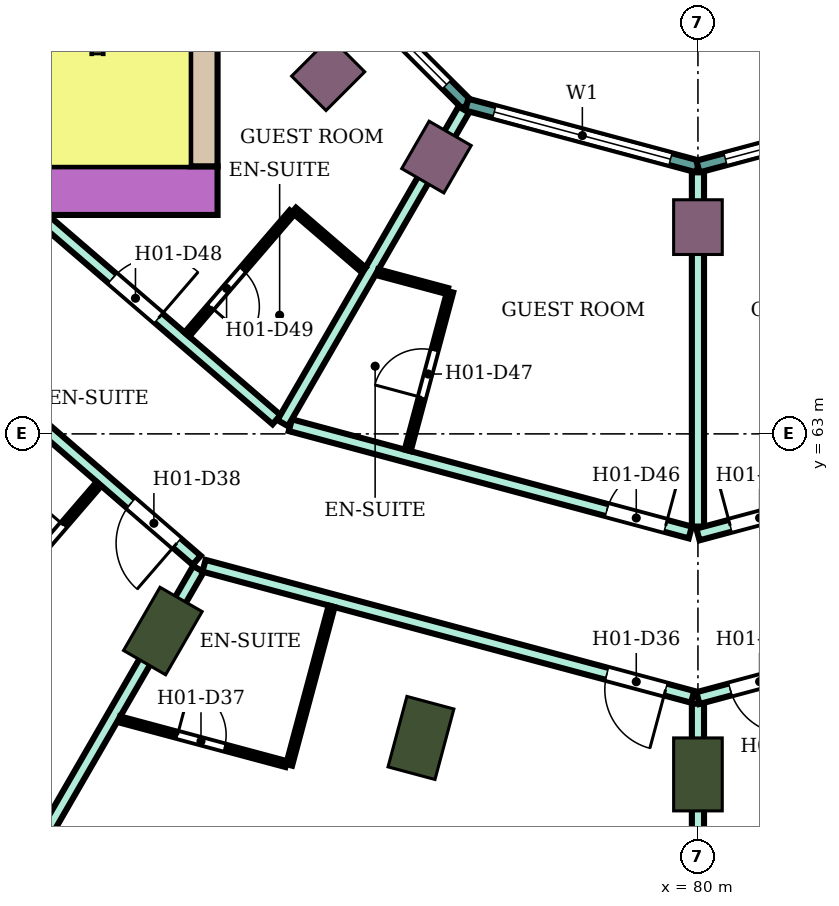
"""IFC4 building model, lengths in metres.
Left out: names, types, materials, properties, quantities, classifications, styles, units other than length and angle.
Written with IfcOpenShell. Run it as: python <this file> out.ifc"""

import sys

from ifc_helpers import new_model, si_unit, direction, frame, frame_2d, origin, origin_2d, place, context, subcontext, project, spatial, rectangle, extrude, element, fill, save


model = new_model("IFC4")
c1 = context("Model", 3, precision=1e-05, world=origin(), true_north=direction((0.0, 1.0)))
c2 = subcontext(c1, "Body", "Model", "MODEL_VIEW")
j1 = project(units=[si_unit("LENGTHUNIT", "METRE"), si_unit("PLANEANGLEUNIT", "RADIAN")], contexts=[c1])
p1 = place(None, origin())
s1 = spatial("IfcSite", under=j1, at=p1, CompositionType="ELEMENT")
p2 = place(p1, origin())
s2 = spatial("IfcBuilding", under=s1, at=p2, CompositionType="ELEMENT")
p3 = place(p2, frame((0.0, 0.0, 28.8)))
s3 = spatial("IfcBuildingStorey", under=s2, at=p3, CompositionType="ELEMENT", Elevation=28.8)
for number, where, z_axis, x_axis in (
    (1, (71.2, 59.758, 0.0), (0.0, 0.0, 1.0), (-0.5, -0.866, 0.0)),
    (2, (75.445, 58.0, 0.0), (0.0, 0.0, 1.0), (-0.259, -0.966, 0.0)),
    (3, (80.0, 57.4, 0.0), (0.0, 0.0, 1.0), (0.0, -1.0, 0.0)),
):
    element("IfcColumn", number, at=place(p3, frame(where, z_axis=z_axis, x_axis=x_axis)), inside=s3, PredefinedType="COLUMN", context=c2, shape_type="SweptSolid", body=[
        extrude(rectangle(XDim=1.2, YDim=0.8, at=origin_2d()), origin(), (0.0, 0.0, 1.0), 3.8),
    ])
for number, where, z_axis, x_axis in (
    (4, (73.919, 68.919, 0.0), (0.0, 0.0, 1.0), (-0.707, -0.707, 0.0)),
    (5, (75.7, 67.552, 0.0), (0.0, 0.0, 1.0), (-0.5, -0.866, 0.0)),
    (6, (80.0, 66.4, 0.0), (0.0, 0.0, 1.0), (0.0, -1.0, 0.0)),
):
    element("IfcColumn", number, at=place(p3, frame(where, z_axis=z_axis, x_axis=x_axis)), inside=s3, PredefinedType="COLUMN", context=c2, shape_type="SweptSolid", body=[
        extrude(rectangle(XDim=0.9, YDim=0.8, at=origin_2d()), origin(), (0.0, 0.0, 1.0), 3.8),
    ])
p4 = place(p3, frame((72.1, 67.0, 0.0), z_axis=(0.0, 0.0, 1.0), x_axis=(-1.0, 0.0, 0.0)))
e7 = element("IfcWall", 7, at=p4, inside=s3, PredefinedType="SHEAR", context=c2, shape_type="SweptSolid", body=[
    extrude(rectangle(XDim=14.7, YDim=0.8, at=frame_2d((7.35, 0.0))), origin(), (0.0, 0.0, 1.0), 3.48),
])
p5 = place(p4, frame((4.2, 0.0, 0.0)))
e8 = element("IfcOpeningElement", 8, at=p5, cuts=e7, PredefinedType="OPENING", context=c2, shape_type="SweptSolid", body=[
    extrude(rectangle(XDim=2.4, YDim=2.4, at=frame_2d((1.2, 1.2))), frame((0.0, 0.41, 0.0), z_axis=(0.0, -1.0, 0.0), x_axis=(1.0, 0.0, 0.0)), (0.0, 0.0, 1.0), 0.82),
])
p6 = place(p3, frame((71.875, 75.0, 0.0), z_axis=(0.0, 0.0, 1.0), x_axis=(0.0, -1.0, 0.0)))
e9 = element("IfcWall", 9, at=p6, inside=s3, PredefinedType="SHEAR", context=c2, shape_type="SweptSolid", body=[
    extrude(rectangle(XDim=7.6, YDim=0.45, at=frame_2d((3.8, 0.0))), origin(), (0.0, 0.0, 1.0), 3.48),
])
p7 = place(p3, frame((73.415, 71.198, 0.0), z_axis=(0.0, 0.0, 1.0), x_axis=(0.707106781187, -0.707106781187, 0.0)))
e10 = element("IfcWall", 10, at=p7, inside=s3, PredefinedType="NOTDEFINED", context=c2, shape_type="SweptSolid", body=[
    extrude(rectangle(XDim=3.936, YDim=0.2, at=frame_2d((1.968, 0.0))), origin(), (0.0, 0.0, 1.0), 3.8),
])
p8 = place(p7, frame((0.468, 0.0, 0.9)))
e11 = element("IfcOpeningElement", 11, at=p8, cuts=e10, PredefinedType="OPENING", context=c2, shape_type="SweptSolid", body=[
    extrude(rectangle(XDim=3.0, YDim=2.3, at=frame_2d((1.5, 1.15))), frame((0.0, 0.11, 0.0), z_axis=(0.0, -1.0, 0.0), x_axis=(1.0, 0.0, 0.0)), (0.0, 0.0, 1.0), 0.22),
])
p9 = place(p3, frame((76.198, 68.415, 0.0), z_axis=(0.0, 0.0, 1.0), x_axis=(0.965933654434, -0.258789828301, 0.0)))
e12 = element("IfcWall", 12, at=p9, inside=s3, PredefinedType="NOTDEFINED", context=c2, shape_type="SweptSolid", body=[
    extrude(rectangle(XDim=3.936, YDim=0.2, at=frame_2d((1.968, 0.0))), origin(), (0.0, 0.0, 1.0), 3.8),
])
p10 = place(p9, frame((0.468, 0.0, 0.9)))
e13 = element("IfcOpeningElement", 13, at=p10, cuts=e12, PredefinedType="OPENING", context=c2, shape_type="SweptSolid", body=[
    extrude(rectangle(XDim=3.0, YDim=2.3, at=frame_2d((1.5, 1.15))), frame((0.0, 0.11, 0.0), z_axis=(0.0, -1.0, 0.0), x_axis=(1.0, 0.0, 0.0)), (0.0, 0.0, 1.0), 0.22),
])
p11 = place(p3, frame((80.0, 67.396, 0.0), z_axis=(0.0, 0.0, 1.0), x_axis=(0.965933654434, 0.258789828301, 0.0)))
e14 = element("IfcWall", 14, at=p11, inside=s3, PredefinedType="NOTDEFINED", context=c2, shape_type="SweptSolid", body=[
    extrude(rectangle(XDim=3.936, YDim=0.2, at=frame_2d((1.968, 0.0))), origin(), (0.0, 0.0, 1.0), 3.8),
])
p12 = place(p11, frame((0.468, 0.0, 0.9)))
e15 = element("IfcOpeningElement", 15, at=p12, cuts=e14, PredefinedType="OPENING", context=c2, shape_type="SweptSolid", body=[
    extrude(rectangle(XDim=3.0, YDim=2.3, at=frame_2d((1.5, 1.15))), frame((0.0, 0.11, 0.0), z_axis=(0.0, -1.0, 0.0), x_axis=(1.0, 0.0, 0.0)), (0.0, 0.0, 1.0), 0.22),
])
p13 = place(p3, frame((67.078, 64.968, 0.0), z_axis=(0.0, 0.0, 1.0), x_axis=(0.756371089567, -0.654142778656, 0.0)))
e16 = element("IfcWall", 16, at=p13, inside=s3, PredefinedType="PARTITIONING", context=c2, shape_type="SweptSolid", body=[
    extrude(rectangle(XDim=6.185, YDim=0.2, at=frame_2d((3.093, 0.0))), origin(), (0.0, 0.0, 1.0), 3.35),
])
p14 = place(p13, frame((4.755, 0.0, 0.0)))
e17 = element("IfcOpeningElement", 17, at=p14, cuts=e16, PredefinedType="OPENING", context=c2, shape_type="SweptSolid", body=[
    extrude(rectangle(XDim=1.0, YDim=2.1, at=frame_2d((0.5, 1.05))), frame((0.0, 0.11, 0.0), z_axis=(0.0, -1.0, 0.0), x_axis=(1.0, 0.0, 0.0)), (0.0, 0.0, 1.0), 0.22),
])
p15 = place(p3, frame((67.096, 52.662, 0.0), z_axis=(0.0, 0.0, 1.0), x_axis=(0.500242450002, 0.865885379953, 0.0)))
e18 = element("IfcWall", 18, at=p15, inside=s3, PredefinedType="PARTITIONING", context=c2, shape_type="SweptSolid", body=[
    extrude(rectangle(XDim=9.374, YDim=0.2, at=frame_2d((4.687, 0.0))), origin(), (0.0, 0.0, 1.0), 3.35),
])
p16 = place(p3, frame((69.158, 66.6, 0.0), z_axis=(0.0, 0.0, 1.0), x_axis=(0.757976058094, -0.652282373943, 0.0)))
e19 = element("IfcWall", 19, at=p16, inside=s3, PredefinedType="PARTITIONING", context=c2, shape_type="SweptSolid", body=[
    extrude(rectangle(XDim=5.16, YDim=0.2, at=frame_2d((2.58, 0.0))), origin(), (0.0, 0.0, 1.0), 3.35),
])
p17 = place(p16, frame((1.6, 0.0, 0.0)))
e20 = element("IfcOpeningElement", 20, at=p17, cuts=e19, PredefinedType="OPENING", context=c2, shape_type="SweptSolid", body=[
    extrude(rectangle(XDim=1.0, YDim=2.1, at=frame_2d((0.5, 1.05))), frame((0.0, 0.11, 0.0), z_axis=(0.0, -1.0, 0.0), x_axis=(1.0, 0.0, 0.0)), (0.0, 0.0, 1.0), 0.22),
])
p18 = place(p3, frame((71.877, 60.831, 0.0), z_axis=(0.0, 0.0, 1.0), x_axis=(0.965852509869, -0.259092510851, 0.0)))
e21 = element("IfcWall", 21, at=p18, inside=s3, PredefinedType="PARTITIONING", context=c2, shape_type="SweptSolid", body=[
    extrude(rectangle(XDim=8.32, YDim=0.2, at=frame_2d((4.16, 0.0))), origin(), (0.0, 0.0, 1.0), 3.35),
])
p19 = place(p18, frame((6.86, 0.0, 0.0)))
e22 = element("IfcOpeningElement", 22, at=p19, cuts=e21, PredefinedType="OPENING", context=c2, shape_type="SweptSolid", body=[
    extrude(rectangle(XDim=1.0, YDim=2.1, at=frame_2d((0.5, 1.05))), frame((0.0, 0.11, 0.0), z_axis=(0.0, -1.0, 0.0), x_axis=(1.0, 0.0, 0.0)), (0.0, 0.0, 1.0), 0.22),
])
p20 = place(p3, frame((73.297, 63.143, 0.0), z_axis=(0.0, 0.0, 1.0), x_axis=(0.965859030528, -0.25906820173, 0.0)))
e23 = element("IfcWall", 23, at=p20, inside=s3, PredefinedType="PARTITIONING", context=c2, shape_type="SweptSolid", body=[
    extrude(rectangle(XDim=6.81, YDim=0.2, at=frame_2d((3.405, 0.0))), origin(), (0.0, 0.0, 1.0), 3.35),
])
p21 = place(p20, frame((5.39, 0.0, 0.0)))
e24 = element("IfcOpeningElement", 24, at=p21, cuts=e23, PredefinedType="OPENING", context=c2, shape_type="SweptSolid", body=[
    extrude(rectangle(XDim=1.0, YDim=2.1, at=frame_2d((0.5, 1.05))), frame((0.0, 0.11, 0.0), z_axis=(0.0, -1.0, 0.0), x_axis=(1.0, 0.0, 0.0)), (0.0, 0.0, 1.0), 0.22),
])
p22 = place(p3, frame((73.171, 63.177, 0.0), z_axis=(0.0, 0.0, 1.0), x_axis=(0.500257106344, 0.865876912472, 0.0)))
e25 = element("IfcWall", 25, at=p22, inside=s3, PredefinedType="PARTITIONING", context=c2, shape_type="SweptSolid", body=[
    extrude(rectangle(XDim=5.955, YDim=0.2, at=frame_2d((2.978, 0.0))), origin(), (0.0, 0.0, 1.0), 3.35),
])
p23 = place(p3, frame((80.0, 51.801, 0.0), z_axis=(0.0, 0.0, 1.0), x_axis=(0.0, 1.0, 0.0)))
e26 = element("IfcWall", 26, at=p23, inside=s3, PredefinedType="PARTITIONING", context=c2, shape_type="SweptSolid", body=[
    extrude(rectangle(XDim=6.762, YDim=0.2, at=frame_2d((3.381, 0.0))), origin(), (0.0, 0.0, 1.0), 3.35),
])
p24 = place(p3, frame((80.0, 58.655, 0.0), z_axis=(0.0, 0.0, 1.0), x_axis=(0.965974635626, 0.258636817424, 0.0)))
e27 = element("IfcWall", 27, at=p24, inside=s3, PredefinedType="PARTITIONING", context=c2, shape_type="SweptSolid", body=[
    extrude(rectangle(XDim=8.36, YDim=0.2, at=frame_2d((4.18, 0.0))), origin(), (0.0, 0.0, 1.0), 3.35),
])
p25 = place(p24, frame((6.86, 0.0, 0.0)))
e28 = element("IfcOpeningElement", 28, at=p25, cuts=e27, PredefinedType="OPENING", context=c2, shape_type="SweptSolid", body=[
    extrude(rectangle(XDim=1.0, YDim=2.1, at=frame_2d((0.5, 1.05))), frame((0.0, 0.11, 0.0), z_axis=(0.0, -1.0, 0.0), x_axis=(1.0, 0.0, 0.0)), (0.0, 0.0, 1.0), 0.22),
])
p26 = place(p24, frame((0.55, 0.0, 0.0)))
e29 = element("IfcOpeningElement", 29, at=p26, cuts=e27, PredefinedType="OPENING", context=c2, shape_type="SweptSolid", body=[
    extrude(rectangle(XDim=1.0, YDim=2.1, at=frame_2d((0.5, 1.05))), frame((0.0, 0.11, 0.0), z_axis=(0.0, -1.0, 0.0), x_axis=(1.0, 0.0, 0.0)), (0.0, 0.0, 1.0), 0.22),
])
p27 = place(p3, frame((80.0, 61.476, 0.0), z_axis=(0.0, 0.0, 1.0), x_axis=(0.0, 1.0, 0.0)))
e30 = element("IfcWall", 30, at=p27, inside=s3, PredefinedType="PARTITIONING", context=c2, shape_type="SweptSolid", body=[
    extrude(rectangle(XDim=5.825, YDim=0.2, at=frame_2d((2.913, 0.0))), origin(), (0.0, 0.0, 1.0), 3.35),
])
p28 = place(p3, frame((80.0, 61.346, 0.0), z_axis=(0.0, 0.0, 1.0), x_axis=(0.965924181808, 0.258825182312, 0.0)))
e31 = element("IfcWall", 31, at=p28, inside=s3, PredefinedType="PARTITIONING", context=c2, shape_type="SweptSolid", body=[
    extrude(rectangle(XDim=6.94, YDim=0.2, at=frame_2d((3.47, 0.0))), origin(), (0.0, 0.0, 1.0), 3.35),
])
p29 = place(p28, frame((0.55, 0.0, 0.0)))
e32 = element("IfcOpeningElement", 32, at=p29, cuts=e31, PredefinedType="OPENING", context=c2, shape_type="SweptSolid", body=[
    extrude(rectangle(XDim=1.0, YDim=2.1, at=frame_2d((0.5, 1.05))), frame((0.0, 0.11, 0.0), z_axis=(0.0, -1.0, 0.0), x_axis=(1.0, 0.0, 0.0)), (0.0, 0.0, 1.0), 0.22),
])
p30 = place(p3, frame((68.393, 60.135, 0.0), z_axis=(0.0, 0.0, 1.0), x_axis=(0.652061182569, 0.758166349944, 0.0)))
e33 = element("IfcWall", 33, at=p30, inside=s3, PredefinedType="PARTITIONING", context=c2, shape_type="SweptSolid", body=[
    extrude(rectangle(XDim=2.69, YDim=0.1, at=frame_2d((1.345, 0.0))), origin(), (0.0, 0.0, 1.0), 3.35),
])
p31 = place(p30, frame((1.0, 0.0, 0.0)))
e34 = element("IfcOpeningElement", 34, at=p31, cuts=e33, PredefinedType="OPENING", context=c2, shape_type="SweptSolid", body=[
    extrude(rectangle(XDim=0.8, YDim=2.1, at=frame_2d((0.4, 1.05))), frame((0.0, 0.06, 0.0), z_axis=(0.0, -1.0, 0.0), x_axis=(1.0, 0.0, 0.0)), (0.0, 0.0, 1.0), 0.12),
])
p32 = place(p3, frame((70.484, 58.305, 0.0), z_axis=(0.0, 0.0, 1.0), x_axis=(0.965904703781, -0.258897862512, 0.0)))
e35 = element("IfcWall", 35, at=p32, inside=s3, PredefinedType="PARTITIONING", context=c2, shape_type="SweptSolid", body=[
    extrude(rectangle(XDim=2.841, YDim=0.1, at=frame_2d((1.421, 0.0))), origin(), (0.0, 0.0, 1.0), 3.35),
])
p33 = place(p32, frame((0.99, 0.0, 0.0)))
e36 = element("IfcOpeningElement", 36, at=p33, cuts=e35, PredefinedType="OPENING", context=c2, shape_type="SweptSolid", body=[
    extrude(rectangle(XDim=0.8, YDim=2.1, at=frame_2d((0.4, 1.05))), frame((0.0, 0.06, 0.0), z_axis=(0.0, -1.0, 0.0), x_axis=(1.0, 0.0, 0.0)), (0.0, 0.0, 1.0), 0.12),
])
p34 = place(p3, frame((71.596, 64.635, 0.0), z_axis=(0.0, 0.0, 1.0), x_axis=(0.652285007511, 0.757973791748, 0.0)))
e37 = element("IfcWall", 37, at=p34, inside=s3, PredefinedType="PARTITIONING", context=c2, shape_type="SweptSolid", body=[
    extrude(rectangle(XDim=2.65, YDim=0.1, at=frame_2d((1.325, 0.0))), origin(), (0.0, 0.0, 1.0), 3.35),
])
p35 = place(p34, frame((0.6, 0.0, 0.0)))
e38 = element("IfcOpeningElement", 38, at=p35, cuts=e37, PredefinedType="OPENING", context=c2, shape_type="SweptSolid", body=[
    extrude(rectangle(XDim=0.8, YDim=2.1, at=frame_2d((0.4, 1.05))), frame((0.0, 0.06, 0.0), z_axis=(0.0, -1.0, 0.0), x_axis=(1.0, 0.0, 0.0)), (0.0, 0.0, 1.0), 0.12),
])
p36 = place(p3, frame((73.277, 57.557, 0.0), z_axis=(0.0, 0.0, 1.0), x_axis=(0.258928960762, 0.965896367774, 0.0)))
e39 = element("IfcWall", 39, at=p36, inside=s3, PredefinedType="PARTITIONING", context=c2, shape_type="SweptSolid", body=[
    extrude(rectangle(XDim=2.699, YDim=0.1, at=frame_2d((1.35, 0.0))), origin(), (0.0, 0.0, 1.0), 3.35),
])
p37 = place(p3, frame((73.357, 66.681, 0.0), z_axis=(0.0, 0.0, 1.0), x_axis=(0.758263469747, -0.651948242154, 0.0)))
e40 = element("IfcWall", 40, at=p37, inside=s3, PredefinedType="PARTITIONING", context=c2, shape_type="SweptSolid", body=[
    extrude(rectangle(XDim=1.511, YDim=0.1, at=frame_2d((0.755, 0.0))), origin(), (0.0, 0.0, 1.0), 3.35),
])
p38 = place(p3, frame((74.729, 65.657, 0.0), z_axis=(0.0, 0.0, 1.0), x_axis=(0.965948051503, -0.258736085224, 0.0)))
e41 = element("IfcWall", 41, at=p38, inside=s3, PredefinedType="PARTITIONING", context=c2, shape_type="SweptSolid", body=[
    extrude(rectangle(XDim=1.189, YDim=0.1, at=frame_2d((0.594, 0.0))), origin(), (0.0, 0.0, 1.0), 3.35),
])
p39 = place(p3, frame((75.227, 62.729, 0.0), z_axis=(0.0, 0.0, 1.0), x_axis=(0.258945475746, 0.965891940432, 0.0)))
e42 = element("IfcWall", 42, at=p39, inside=s3, PredefinedType="PARTITIONING", context=c2, shape_type="SweptSolid", body=[
    extrude(rectangle(XDim=2.7, YDim=0.1, at=frame_2d((1.35, 0.0))), origin(), (0.0, 0.0, 1.0), 3.35),
])
p40 = place(p39, frame((0.9, 0.0, 0.0)))
e43 = element("IfcOpeningElement", 43, at=p40, cuts=e42, PredefinedType="OPENING", context=c2, shape_type="SweptSolid", body=[
    extrude(rectangle(XDim=0.8, YDim=2.1, at=frame_2d((0.4, 1.05))), frame((0.0, 0.06, 0.0), z_axis=(0.0, -1.0, 0.0), x_axis=(1.0, 0.0, 0.0)), (0.0, 0.0, 1.0), 0.12),
])
p41 = place(p8, origin())
e44 = element("IfcWindow", 44, at=p41, inside=s3, PartitioningType="SINGLE_PANEL", PredefinedType="WINDOW", context=c2, shape_type="SweptSolid", body=[
    extrude(rectangle(XDim=3.0, YDim=2.3, at=frame_2d((1.5, 1.15))), frame((0.0, 0.03, 0.0), z_axis=(0.0, -1.0, 0.0), x_axis=(1.0, 0.0, 0.0)), (0.0, 0.0, 1.0), 0.06),
])
fill(e11, e44)
p42 = place(p10, origin())
e45 = element("IfcWindow", 45, at=p42, inside=s3, PartitioningType="SINGLE_PANEL", PredefinedType="WINDOW", context=c2, shape_type="SweptSolid", body=[
    extrude(rectangle(XDim=3.0, YDim=2.3, at=frame_2d((1.5, 1.15))), frame((0.0, 0.03, 0.0), z_axis=(0.0, -1.0, 0.0), x_axis=(1.0, 0.0, 0.0)), (0.0, 0.0, 1.0), 0.06),
])
fill(e13, e45)
p43 = place(p12, origin())
e46 = element("IfcWindow", 46, at=p43, inside=s3, PartitioningType="SINGLE_PANEL", PredefinedType="WINDOW", context=c2, shape_type="SweptSolid", body=[
    extrude(rectangle(XDim=3.0, YDim=2.3, at=frame_2d((1.5, 1.15))), frame((0.0, 0.03, 0.0), z_axis=(0.0, -1.0, 0.0), x_axis=(1.0, 0.0, 0.0)), (0.0, 0.0, 1.0), 0.06),
])
fill(e15, e46)
p44 = place(p26, frame((1.0, 0.0, 0.0), z_axis=(0.0, 0.0, 1.0), x_axis=(-1.0, 0.0, 0.0)))
e47 = element("IfcDoor", 47, at=p44, inside=s3, OperationType="SINGLE_SWING_LEFT", PredefinedType="DOOR", context=c2, shape_type="SweptSolid", body=[
    extrude(rectangle(XDim=1.0, YDim=2.1, at=frame_2d((0.5, 1.05))), frame((0.0, 0.025, 0.0), z_axis=(0.0, -1.0, 0.0), x_axis=(1.0, 0.0, 0.0)), (0.0, 0.0, 1.0), 0.05),
])
fill(e29, e47)
p45 = place(p19, frame((1.0, 0.0, 0.0), z_axis=(0.0, 0.0, 1.0), x_axis=(-1.0, 0.0, 0.0)))
e48 = element("IfcDoor", 48, at=p45, inside=s3, OperationType="SINGLE_SWING_LEFT", PredefinedType="DOOR", context=c2, shape_type="SweptSolid", body=[
    extrude(rectangle(XDim=1.0, YDim=2.1, at=frame_2d((0.5, 1.05))), frame((0.0, 0.025, 0.0), z_axis=(0.0, -1.0, 0.0), x_axis=(1.0, 0.0, 0.0)), (0.0, 0.0, 1.0), 0.05),
])
fill(e22, e48)
p46 = place(p33, origin())
e49 = element("IfcDoor", 49, at=p46, inside=s3, OperationType="SINGLE_SWING_LEFT", PredefinedType="DOOR", context=c2, shape_type="SweptSolid", body=[
    extrude(rectangle(XDim=0.8, YDim=2.1, at=frame_2d((0.4, 1.05))), frame((0.0, 0.025, 0.0), z_axis=(0.0, -1.0, 0.0), x_axis=(1.0, 0.0, 0.0)), (0.0, 0.0, 1.0), 0.05),
])
fill(e36, e49)
p47 = place(p14, frame((1.0, 0.0, 0.0), z_axis=(0.0, 0.0, 1.0), x_axis=(-1.0, 0.0, 0.0)))
e50 = element("IfcDoor", 50, at=p47, inside=s3, OperationType="SINGLE_SWING_LEFT", PredefinedType="DOOR", context=c2, shape_type="SweptSolid", body=[
    extrude(rectangle(XDim=1.0, YDim=2.1, at=frame_2d((0.5, 1.05))), frame((0.0, 0.025, 0.0), z_axis=(0.0, -1.0, 0.0), x_axis=(1.0, 0.0, 0.0)), (0.0, 0.0, 1.0), 0.05),
])
fill(e17, e50)
p48 = place(p31, origin())
e51 = element("IfcDoor", 51, at=p48, inside=s3, OperationType="SINGLE_SWING_RIGHT", PredefinedType="DOOR", context=c2, shape_type="SweptSolid", body=[
    extrude(rectangle(XDim=0.8, YDim=2.1, at=frame_2d((0.4, 1.05))), frame((0.0, 0.025, 0.0), z_axis=(0.0, -1.0, 0.0), x_axis=(1.0, 0.0, 0.0)), (0.0, 0.0, 1.0), 0.05),
])
fill(e34, e51)
p49 = place(p29, origin())
e52 = element("IfcDoor", 52, at=p49, inside=s3, OperationType="SINGLE_SWING_LEFT", PredefinedType="DOOR", context=c2, shape_type="SweptSolid", body=[
    extrude(rectangle(XDim=1.0, YDim=2.1, at=frame_2d((0.5, 1.05))), frame((0.0, 0.025, 0.0), z_axis=(0.0, -1.0, 0.0), x_axis=(1.0, 0.0, 0.0)), (0.0, 0.0, 1.0), 0.05),
])
fill(e32, e52)
p50 = place(p21, origin())
e53 = element("IfcDoor", 53, at=p50, inside=s3, OperationType="SINGLE_SWING_RIGHT", PredefinedType="DOOR", context=c2, shape_type="SweptSolid", body=[
    extrude(rectangle(XDim=1.0, YDim=2.1, at=frame_2d((0.5, 1.05))), frame((0.0, 0.025, 0.0), z_axis=(0.0, -1.0, 0.0), x_axis=(1.0, 0.0, 0.0)), (0.0, 0.0, 1.0), 0.05),
])
fill(e24, e53)
p51 = place(p40, origin())
e54 = element("IfcDoor", 54, at=p51, inside=s3, OperationType="SINGLE_SWING_LEFT", PredefinedType="DOOR", context=c2, shape_type="SweptSolid", body=[
    extrude(rectangle(XDim=0.8, YDim=2.1, at=frame_2d((0.4, 1.05))), frame((0.0, 0.025, 0.0), z_axis=(0.0, -1.0, 0.0), x_axis=(1.0, 0.0, 0.0)), (0.0, 0.0, 1.0), 0.05),
])
fill(e43, e54)
p52 = place(p17, origin())
e55 = element("IfcDoor", 55, at=p52, inside=s3, OperationType="SINGLE_SWING_RIGHT", PredefinedType="DOOR", context=c2, shape_type="SweptSolid", body=[
    extrude(rectangle(XDim=1.0, YDim=2.1, at=frame_2d((0.5, 1.05))), frame((0.0, 0.025, 0.0), z_axis=(0.0, -1.0, 0.0), x_axis=(1.0, 0.0, 0.0)), (0.0, 0.0, 1.0), 0.05),
])
fill(e20, e55)
p53 = place(p35, frame((0.8, 0.0, 0.0), z_axis=(0.0, 0.0, 1.0), x_axis=(-1.0, 0.0, 0.0)))
e56 = element("IfcDoor", 56, at=p53, inside=s3, OperationType="SINGLE_SWING_RIGHT", PredefinedType="DOOR", context=c2, shape_type="SweptSolid", body=[
    extrude(rectangle(XDim=0.8, YDim=2.1, at=frame_2d((0.4, 1.05))), frame((0.0, 0.025, 0.0), z_axis=(0.0, -1.0, 0.0), x_axis=(1.0, 0.0, 0.0)), (0.0, 0.0, 1.0), 0.05),
])
fill(e38, e56)
save(model, sys.argv[1])
